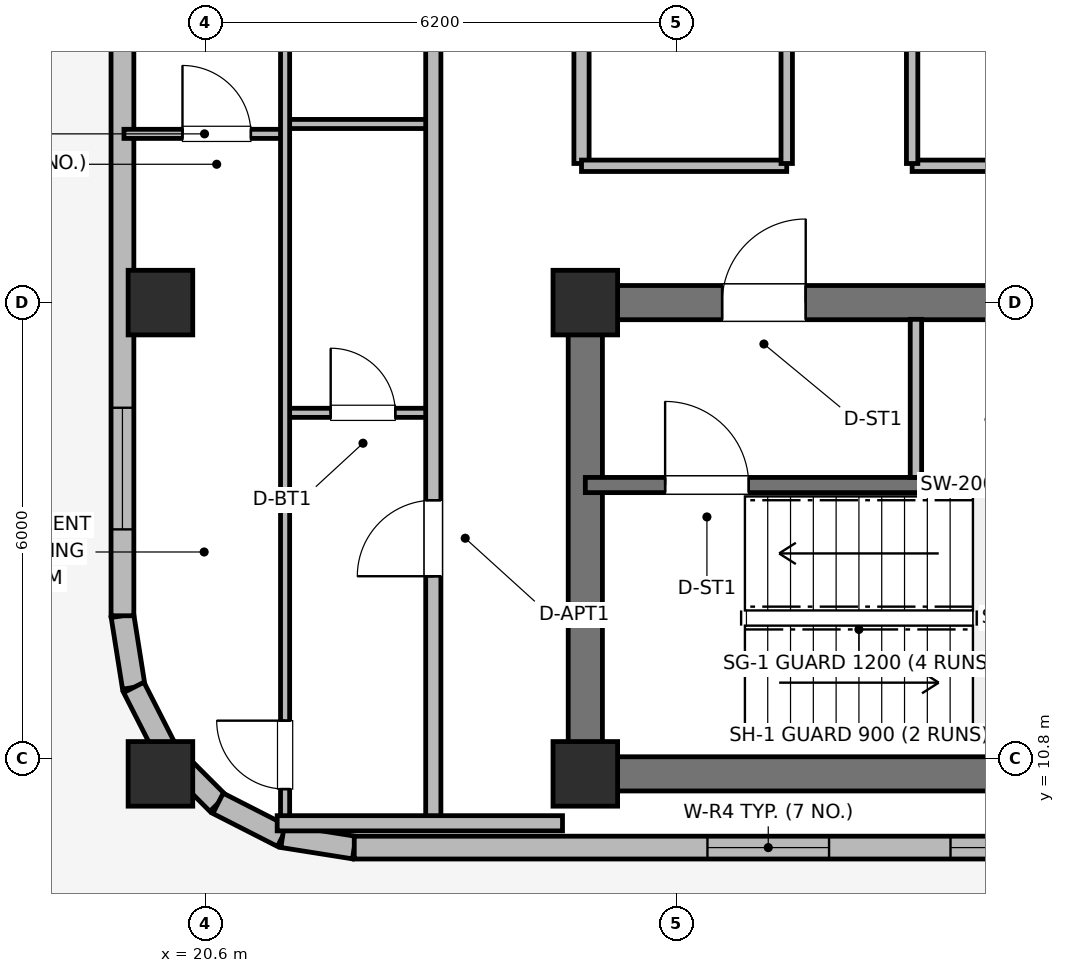
"""IFC4 building model, lengths in metres.
Left out: names, types, materials, properties, quantities, classifications, styles, units other than length and angle.
Written with IfcOpenShell. Run it as: python <this file> out.ifc"""

import sys

from ifc_helpers import new_model, si_unit, direction, frame, frame_2d, origin, origin_2d, place, context, subcontext, project, spatial, rectangle, extrude, element, fill, save


model = new_model("IFC4")
c1 = context("Model", 3, precision=1e-05, world=origin(), true_north=direction((0.0, 1.0)))
c2 = subcontext(c1, "Body", "Model", "MODEL_VIEW")
j1 = project(units=[si_unit("LENGTHUNIT", "METRE"), si_unit("PLANEANGLEUNIT", "RADIAN")], contexts=[c1])
p1 = place(None, origin())
s1 = spatial("IfcSite", under=j1, at=p1, CompositionType="ELEMENT")
p2 = place(p1, origin())
s2 = spatial("IfcBuilding", under=s1, at=p2, CompositionType="ELEMENT")
p3 = place(p2, frame((0.0, 0.0, 225.8)))
s3 = spatial("IfcBuildingStorey", under=s2, at=p3, CompositionType="ELEMENT", Elevation=225.8)
p4 = place(p3, frame((52.8, 10.6, 0.0), z_axis=(0.0, 0.0, 1.0), x_axis=(-1.0, 0.0, 0.0)))
e1 = element("IfcWall", 1, at=p4, inside=s3, PredefinedType="SHEAR", context=c2, shape_type="SweptSolid", body=[
    extrude(rectangle(XDim=27.2, YDim=0.45, at=frame_2d((13.6, 0.0))), origin(), (0.0, 0.0, 1.0), 3.7),
])
p5 = place(p3, frame((25.6, 10.825, 0.0), z_axis=(0.0, 0.0, 1.0), x_axis=(0.0, 1.0, 0.0)))
e2 = element("IfcWall", 2, at=p5, inside=s3, PredefinedType="SHEAR", context=c2, shape_type="SweptSolid", body=[
    extrude(rectangle(XDim=5.75, YDim=0.45, at=frame_2d((2.875, 0.0))), origin(), (0.0, 0.0, 1.0), 3.7),
])
p6 = place(p3, frame((25.6, 16.8, 0.0), z_axis=(0.0, 0.0, 1.0), x_axis=(1.0, 0.0, 0.0)))
e3 = element("IfcWall", 3, at=p6, inside=s3, PredefinedType="SHEAR", context=c2, shape_type="SweptSolid", body=[
    extrude(rectangle(XDim=27.2, YDim=0.45, at=frame_2d((13.6, 0.0))), origin(), (0.0, 0.0, 1.0), 3.7),
])
p7 = place(p6, frame((1.8, 0.0, 0.0)))
e4 = element("IfcOpeningElement", 4, at=p7, cuts=e3, PredefinedType="OPENING", context=c2, shape_type="SweptSolid", body=[
    extrude(rectangle(XDim=1.1, YDim=2.15, at=frame_2d((0.55, 1.075))), frame((0.0, 0.235, 0.0), z_axis=(0.0, -1.0, 0.0), x_axis=(1.0, 0.0, 0.0)), (0.0, 0.0, 1.0), 0.47),
])
p8 = place(p6, frame((5.6, 0.0, 0.0)))
e5 = element("IfcOpeningElement", 5, at=p8, cuts=e3, PredefinedType="OPENING", context=c2, shape_type="SweptSolid", body=[
    extrude(rectangle(XDim=0.85, YDim=2.1, at=frame_2d((0.425, 1.05))), frame((0.0, 0.235, 0.0), z_axis=(0.0, -1.0, 0.0), x_axis=(1.0, 0.0, 0.0)), (0.0, 0.0, 1.0), 0.47),
])
p9 = place(p6, frame((13.0, 0.0, 0.0)))
e6 = element("IfcOpeningElement", 6, at=p9, cuts=e3, PredefinedType="OPENING", context=c2, shape_type="SweptSolid", body=[
    extrude(rectangle(XDim=1.2, YDim=2.15, at=frame_2d((0.6, 1.075))), frame((0.0, 0.235, 0.0), z_axis=(0.0, -1.0, 0.0), x_axis=(1.0, 0.0, 0.0)), (0.0, 0.0, 1.0), 0.47),
])
p10 = place(p6, frame((19.2, 0.0, 0.0)))
e7 = element("IfcOpeningElement", 7, at=p10, cuts=e3, PredefinedType="OPENING", context=c2, shape_type="SweptSolid", body=[
    extrude(rectangle(XDim=0.85, YDim=2.1, at=frame_2d((0.425, 1.05))), frame((0.0, 0.235, 0.0), z_axis=(0.0, -1.0, 0.0), x_axis=(1.0, 0.0, 0.0)), (0.0, 0.0, 1.0), 0.47),
])
p11 = place(p6, frame((23.8, 0.0, 0.0)))
e8 = element("IfcOpeningElement", 8, at=p11, cuts=e3, PredefinedType="OPENING", context=c2, shape_type="SweptSolid", body=[
    extrude(rectangle(XDim=0.9, YDim=2.1, at=frame_2d((0.45, 1.05))), frame((0.0, 0.235, 0.0), z_axis=(0.0, -1.0, 0.0), x_axis=(1.0, 0.0, 0.0)), (0.0, 0.0, 1.0), 0.47),
])
for number, where, z_axis, x_axis in (
    (9, (25.6, 10.6, 0.0), (0.0, 0.0, 1.0), (1.0, 0.0, 0.0)),
    (10, (25.6, 16.8, 0.0), (0.0, 0.0, 1.0), (1.0, 0.0, 0.0)),
    (11, (20.01, 10.6, 0.0), (0.0, 0.0, 1.0), (1.0, 0.0, 0.0)),
    (12, (20.01, 16.8, 0.0), (0.0, 0.0, 1.0), (1.0, 0.0, 0.0)),
):
    element("IfcColumn", number, at=place(p3, frame(where, z_axis=z_axis, x_axis=x_axis)), inside=s3, PredefinedType="COLUMN", context=c2, shape_type="SweptSolid", body=[
        extrude(rectangle(XDim=0.85, YDim=0.85, at=origin_2d()), origin(), (0.0, 0.0, 1.0), 3.7),
    ])
p12 = place(p3, frame((19.51, 12.68, 0.0), z_axis=(0.0, 0.0, 1.0), x_axis=(0.156343617883, -0.987702725088, 0.0)))
e13 = element("IfcWall", 13, at=p12, inside=s3, PredefinedType="SOLIDWALL", context=c2, shape_type="SweptSolid", body=[
    extrude(rectangle(XDim=0.954, YDim=0.3, at=frame_2d((0.477, 0.0))), origin(), (0.0, 0.0, 1.0), 2.73),
])
for number, where, z_axis, x_axis in (
    (14, (19.659, 11.738, 0.0), (0.0, 0.0, 1.0), (0.454, -0.891, 0.0)),
    (15, (20.093, 10.887, 0.0), (0.0, 0.0, 1.0), (0.707, -0.707, 0.0)),
):
    element("IfcWall", number, at=place(p3, frame(where, z_axis=z_axis, x_axis=x_axis)), inside=s3, PredefinedType="SOLIDWALL", context=c2, shape_type="SweptSolid", body=[
        extrude(rectangle(XDim=0.954, YDim=0.3, at=frame_2d((0.477, 0.0))), origin(), (0.0, 0.0, 1.0), 2.73),
    ])
p13 = place(p3, frame((20.767, 10.212, 0.0), z_axis=(0.0, 0.0, 1.0), x_axis=(0.891023873617, -0.45395644796, 0.0)))
e16 = element("IfcWall", 16, at=p13, inside=s3, PredefinedType="SOLIDWALL", context=c2, shape_type="SweptSolid", body=[
    extrude(rectangle(XDim=0.954, YDim=0.3, at=frame_2d((0.477, 0.0))), origin(), (0.0, 0.0, 1.0), 2.73),
])
p14 = place(p3, frame((21.617, 9.779, 0.0), z_axis=(0.0, 0.0, 1.0), x_axis=(0.987669453596, -0.156553666304, 0.0)))
e17 = element("IfcWall", 17, at=p14, inside=s3, PredefinedType="SOLIDWALL", context=c2, shape_type="SweptSolid", body=[
    extrude(rectangle(XDim=0.954, YDim=0.3, at=frame_2d((0.477, 0.0))), origin(), (0.0, 0.0, 1.0), 2.73),
])
p15 = place(p3, frame((22.56, 9.63, 0.0), z_axis=(0.0, 0.0, 1.0), x_axis=(1.0, 0.0, 0.0)))
e18 = element("IfcWall", 18, at=p15, inside=s3, PredefinedType="SOLIDWALL", context=c2, shape_type="SweptSolid", body=[
    extrude(rectangle(XDim=33.28, YDim=0.3, at=frame_2d((16.64, 0.0))), origin(), (0.0, 0.0, 1.0), 2.73),
])
p16 = place(p15, frame((4.647, 0.0, 0.71)))
e19 = element("IfcOpeningElement", 19, at=p16, cuts=e18, PredefinedType="OPENING", context=c2, shape_type="SweptSolid", body=[
    extrude(rectangle(XDim=1.6, YDim=1.9, at=frame_2d((0.8, 0.95))), frame((0.0, 0.16, 0.0), z_axis=(0.0, -1.0, 0.0), x_axis=(1.0, 0.0, 0.0)), (0.0, 0.0, 1.0), 0.32),
])
p17 = place(p15, frame((7.845, 0.0, 0.71)))
e20 = element("IfcOpeningElement", 20, at=p17, cuts=e18, PredefinedType="OPENING", context=c2, shape_type="SweptSolid", body=[
    extrude(rectangle(XDim=1.6, YDim=1.9, at=frame_2d((0.8, 0.95))), frame((0.0, 0.16, 0.0), z_axis=(0.0, -1.0, 0.0), x_axis=(1.0, 0.0, 0.0)), (0.0, 0.0, 1.0), 0.32),
])
p18 = place(p15, frame((14.241, 0.0, 0.71)))
e21 = element("IfcOpeningElement", 21, at=p18, cuts=e18, PredefinedType="OPENING", context=c2, shape_type="SweptSolid", body=[
    extrude(rectangle(XDim=1.6, YDim=1.9, at=frame_2d((0.8, 0.95))), frame((0.0, 0.16, 0.0), z_axis=(0.0, -1.0, 0.0), x_axis=(1.0, 0.0, 0.0)), (0.0, 0.0, 1.0), 0.32),
])
p19 = place(p15, frame((17.439, 0.0, 0.71)))
e22 = element("IfcOpeningElement", 22, at=p19, cuts=e18, PredefinedType="OPENING", context=c2, shape_type="SweptSolid", body=[
    extrude(rectangle(XDim=1.6, YDim=1.9, at=frame_2d((0.8, 0.95))), frame((0.0, 0.16, 0.0), z_axis=(0.0, -1.0, 0.0), x_axis=(1.0, 0.0, 0.0)), (0.0, 0.0, 1.0), 0.32),
])
p20 = place(p15, frame((23.835, 0.0, 0.71)))
e23 = element("IfcOpeningElement", 23, at=p20, cuts=e18, PredefinedType="OPENING", context=c2, shape_type="SweptSolid", body=[
    extrude(rectangle(XDim=1.6, YDim=1.9, at=frame_2d((0.8, 0.95))), frame((0.0, 0.16, 0.0), z_axis=(0.0, -1.0, 0.0), x_axis=(1.0, 0.0, 0.0)), (0.0, 0.0, 1.0), 0.32),
])
p21 = place(p15, frame((27.033, 0.0, 0.71)))
e24 = element("IfcOpeningElement", 24, at=p21, cuts=e18, PredefinedType="OPENING", context=c2, shape_type="SweptSolid", body=[
    extrude(rectangle(XDim=1.6, YDim=1.9, at=frame_2d((0.8, 0.95))), frame((0.0, 0.16, 0.0), z_axis=(0.0, -1.0, 0.0), x_axis=(1.0, 0.0, 0.0)), (0.0, 0.0, 1.0), 0.32),
])
p22 = place(p3, frame((19.51, 23.8, 0.0), z_axis=(0.0, 0.0, 1.0), x_axis=(0.0, -1.0, 0.0)))
e25 = element("IfcWall", 25, at=p22, inside=s3, PredefinedType="SOLIDWALL", context=c2, shape_type="SweptSolid", body=[
    extrude(rectangle(XDim=11.12, YDim=0.3, at=frame_2d((5.56, 0.0))), origin(), (0.0, 0.0, 1.0), 2.73),
])
p23 = place(p22, frame((1.95, 0.0, 0.0)))
e26 = element("IfcOpeningElement", 26, at=p23, cuts=e25, PredefinedType="OPENING", context=c2, shape_type="SweptSolid", body=[
    extrude(rectangle(XDim=1.5, YDim=2.1, at=frame_2d((0.75, 1.05))), frame((0.0, 0.16, 0.0), z_axis=(0.0, -1.0, 0.0), x_axis=(1.0, 0.0, 0.0)), (0.0, 0.0, 1.0), 0.32),
])
p24 = place(p22, frame((8.383, 0.0, 0.71)))
e27 = element("IfcOpeningElement", 27, at=p24, cuts=e25, PredefinedType="OPENING", context=c2, shape_type="SweptSolid", body=[
    extrude(rectangle(XDim=1.6, YDim=1.9, at=frame_2d((0.8, 0.95))), frame((0.0, 0.16, 0.0), z_axis=(0.0, -1.0, 0.0), x_axis=(1.0, 0.0, 0.0)), (0.0, 0.0, 1.0), 0.32),
])
p25 = place(p3, frame((25.6, 14.4, 0.0), z_axis=(0.0, 0.0, 1.0), x_axis=(1.0, 0.0, 0.0)))
e28 = element("IfcWall", 28, at=p25, inside=s3, PredefinedType="SHEAR", context=c2, shape_type="SweptSolid", body=[
    extrude(rectangle(XDim=9.55, YDim=0.2, at=frame_2d((4.775, 0.0))), origin(), (0.0, 0.0, 1.0), 3.7),
])
p26 = place(p25, frame((1.05, 0.0, 0.0)))
e29 = element("IfcOpeningElement", 29, at=p26, cuts=e28, PredefinedType="OPENING", context=c2, shape_type="SweptSolid", body=[
    extrude(rectangle(XDim=1.1, YDim=2.15, at=frame_2d((0.55, 1.075))), frame((0.0, 0.11, 0.0), z_axis=(0.0, -1.0, 0.0), x_axis=(1.0, 0.0, 0.0)), (0.0, 0.0, 1.0), 0.22),
])
p27 = place(p3, frame((29.95, 14.5, 0.0), z_axis=(0.0, 0.0, 1.0), x_axis=(0.0, 1.0, 0.0)))
e30 = element("IfcWall", 30, at=p27, inside=s3, PredefinedType="PARTITIONING", context=c2, shape_type="SweptSolid", body=[
    extrude(rectangle(XDim=2.08, YDim=0.15, at=frame_2d((1.04, 0.0))), origin(), (0.0, 0.0, 1.0), 2.56),
])
p28 = place(p3, frame((25.55, 18.63, 0.0), z_axis=(0.0, 0.0, 1.0), x_axis=(0.0, 1.0, 0.0)))
e31 = element("IfcWall", 31, at=p28, inside=s3, PredefinedType="PARTITIONING", context=c2, shape_type="SweptSolid", body=[
    extrude(rectangle(XDim=19.14, YDim=0.2, at=frame_2d((9.57, 0.0))), origin(), (0.0, 0.0, 1.0), 2.56),
])
p29 = place(p3, frame((25.55, 18.6, 0.0), z_axis=(0.0, 0.0, 1.0), x_axis=(1.0, 0.0, 0.0)))
e32 = element("IfcWall", 32, at=p29, inside=s3, PredefinedType="PARTITIONING", context=c2, shape_type="SweptSolid", body=[
    extrude(rectangle(XDim=2.7, YDim=0.15, at=frame_2d((1.35, 0.0))), origin(), (0.0, 0.0, 1.0), 2.56),
])
p30 = place(p3, frame((29.9, 18.6, 0.0), z_axis=(0.0, 0.0, 1.0), x_axis=(1.0, 0.0, 0.0)))
e33 = element("IfcWall", 33, at=p30, inside=s3, PredefinedType="PARTITIONING", context=c2, shape_type="SweptSolid", body=[
    extrude(rectangle(XDim=22.95, YDim=0.15, at=frame_2d((11.475, 0.0))), origin(), (0.0, 0.0, 1.0), 2.56),
])
p31 = place(p3, frame((28.25, 18.63, 0.0), z_axis=(0.0, 0.0, 1.0), x_axis=(0.0, 1.0, 0.0)))
e34 = element("IfcWall", 34, at=p31, inside=s3, PredefinedType="PARTITIONING", context=c2, shape_type="SweptSolid", body=[
    extrude(rectangle(XDim=19.14, YDim=0.15, at=frame_2d((9.57, 0.0))), origin(), (0.0, 0.0, 1.0), 2.56),
])
p32 = place(p31, frame((3.0, 0.0, 0.0)))
e35 = element("IfcOpeningElement", 35, at=p32, cuts=e34, PredefinedType="OPENING", context=c2, shape_type="SweptSolid", body=[
    extrude(rectangle(XDim=0.9, YDim=2.1, at=frame_2d((0.45, 1.05))), frame((0.0, 0.085, 0.0), z_axis=(0.0, -1.0, 0.0), x_axis=(1.0, 0.0, 0.0)), (0.0, 0.0, 1.0), 0.17),
])
p33 = place(p31, frame((11.5, 0.0, 0.0)))
e36 = element("IfcOpeningElement", 36, at=p33, cuts=e34, PredefinedType="OPENING", context=c2, shape_type="SweptSolid", body=[
    extrude(rectangle(XDim=0.9, YDim=2.1, at=frame_2d((0.45, 1.05))), frame((0.0, 0.085, 0.0), z_axis=(0.0, -1.0, 0.0), x_axis=(1.0, 0.0, 0.0)), (0.0, 0.0, 1.0), 0.17),
])
p34 = place(p3, frame((29.9, 18.63, 0.0), z_axis=(0.0, 0.0, 1.0), x_axis=(0.0, 1.0, 0.0)))
e37 = element("IfcWall", 37, at=p34, inside=s3, PredefinedType="PARTITIONING", context=c2, shape_type="SweptSolid", body=[
    extrude(rectangle(XDim=19.14, YDim=0.15, at=frame_2d((9.57, 0.0))), origin(), (0.0, 0.0, 1.0), 2.56),
])
p35 = place(p34, frame((2.4, 0.0, 0.0)))
e38 = element("IfcOpeningElement", 38, at=p35, cuts=e37, PredefinedType="OPENING", context=c2, shape_type="SweptSolid", body=[
    extrude(rectangle(XDim=1.0, YDim=2.15, at=frame_2d((0.5, 1.075))), frame((0.0, 0.085, 0.0), z_axis=(0.0, -1.0, 0.0), x_axis=(1.0, 0.0, 0.0)), (0.0, 0.0, 1.0), 0.17),
])
p36 = place(p34, frame((8.89, 0.0, 0.0)))
e39 = element("IfcOpeningElement", 39, at=p36, cuts=e37, PredefinedType="OPENING", context=c2, shape_type="SweptSolid", body=[
    extrude(rectangle(XDim=1.0, YDim=2.15, at=frame_2d((0.5, 1.075))), frame((0.0, 0.085, 0.0), z_axis=(0.0, -1.0, 0.0), x_axis=(1.0, 0.0, 0.0)), (0.0, 0.0, 1.0), 0.17),
])
p37 = place(p3, frame((21.65, 15.35, 0.0), z_axis=(0.0, 0.0, 1.0), x_axis=(1.0, 0.0, 0.0)))
e40 = element("IfcWall", 40, at=p37, inside=s3, PredefinedType="PARTITIONING", context=c2, shape_type="SweptSolid", body=[
    extrude(rectangle(XDim=1.95, YDim=0.12, at=frame_2d((0.975, 0.0))), origin(), (0.0, 0.0, 1.0), 2.56),
])
p38 = place(p37, frame((0.6, 0.0, 0.0)))
e41 = element("IfcOpeningElement", 41, at=p38, cuts=e40, PredefinedType="OPENING", context=c2, shape_type="SweptSolid", body=[
    extrude(rectangle(XDim=0.85, YDim=2.1, at=frame_2d((0.425, 1.05))), frame((0.0, 0.07, 0.0), z_axis=(0.0, -1.0, 0.0), x_axis=(1.0, 0.0, 0.0)), (0.0, 0.0, 1.0), 0.14),
])
p39 = place(p3, frame((21.65, 19.15, 0.0), z_axis=(0.0, 0.0, 1.0), x_axis=(1.0, 0.0, 0.0)))
e42 = element("IfcWall", 42, at=p39, inside=s3, PredefinedType="PARTITIONING", context=c2, shape_type="SweptSolid", body=[
    extrude(rectangle(XDim=1.95, YDim=0.12, at=frame_2d((0.975, 0.0))), origin(), (0.0, 0.0, 1.0), 2.56),
])
p40 = place(p3, frame((19.53, 19.02, 0.0), z_axis=(0.0, 0.0, 1.0), x_axis=(1.0, 0.0, 0.0)))
e43 = element("IfcWall", 43, at=p40, inside=s3, PredefinedType="PARTITIONING", context=c2, shape_type="SweptSolid", body=[
    extrude(rectangle(XDim=2.12, YDim=0.12, at=frame_2d((1.06, 0.0))), origin(), (0.0, 0.0, 1.0), 2.56),
])
p41 = place(p40, frame((0.77, 0.0, 0.0)))
e44 = element("IfcOpeningElement", 44, at=p41, cuts=e43, PredefinedType="OPENING", context=c2, shape_type="SweptSolid", body=[
    extrude(rectangle(XDim=0.9, YDim=2.1, at=frame_2d((0.45, 1.05))), frame((0.0, 0.07, 0.0), z_axis=(0.0, -1.0, 0.0), x_axis=(1.0, 0.0, 0.0)), (0.0, 0.0, 1.0), 0.14),
])
p42 = place(p3, frame((21.65, 9.99, 0.0), z_axis=(0.0, 0.0, 1.0), x_axis=(0.0, 1.0, 0.0)))
e45 = element("IfcWall", 45, at=p42, inside=s3, PredefinedType="PARTITIONING", context=c2, shape_type="SweptSolid", body=[
    extrude(rectangle(XDim=36.42, YDim=0.12, at=frame_2d((18.21, 0.0))), origin(), (0.0, 0.0, 1.0), 2.56),
])
p43 = place(p42, frame((0.41, 0.0, 0.0)))
e46 = element("IfcOpeningElement", 46, at=p43, cuts=e45, PredefinedType="OPENING", context=c2, shape_type="SweptSolid", body=[
    extrude(rectangle(XDim=0.9, YDim=2.1, at=frame_2d((0.45, 1.05))), frame((0.0, 0.07, 0.0), z_axis=(0.0, -1.0, 0.0), x_axis=(1.0, 0.0, 0.0)), (0.0, 0.0, 1.0), 0.14),
])
p44 = place(p42, frame((15.56, 0.0, 0.0)))
e47 = element("IfcOpeningElement", 47, at=p44, cuts=e45, PredefinedType="OPENING", context=c2, shape_type="SweptSolid", body=[
    extrude(rectangle(XDim=0.82, YDim=2.08, at=frame_2d((0.41, 1.04))), frame((0.0, 0.07, 0.0), z_axis=(0.0, -1.0, 0.0), x_axis=(1.0, 0.0, 0.0)), (0.0, 0.0, 1.0), 0.14),
])
p45 = place(p3, frame((23.6, 9.95, 0.0), z_axis=(0.0, 0.0, 1.0), x_axis=(0.0, 1.0, 0.0)))
e48 = element("IfcWall", 48, at=p45, inside=s3, PredefinedType="PARTITIONING", context=c2, shape_type="SweptSolid", body=[
    extrude(rectangle(XDim=36.5, YDim=0.2, at=frame_2d((18.25, 0.0))), origin(), (0.0, 0.0, 1.0), 2.56),
])
p46 = place(p45, frame((3.25, 0.0, 0.0)))
e49 = element("IfcOpeningElement", 49, at=p46, cuts=e48, PredefinedType="OPENING", context=c2, shape_type="SweptSolid", body=[
    extrude(rectangle(XDim=1.0, YDim=2.15, at=frame_2d((0.5, 1.075))), frame((0.0, 0.11, 0.0), z_axis=(0.0, -1.0, 0.0), x_axis=(1.0, 0.0, 0.0)), (0.0, 0.0, 1.0), 0.22),
])
p47 = place(p3, frame((21.546, 9.95, 0.0), z_axis=(0.0, 0.0, 1.0), x_axis=(1.0, 0.0, 0.0)))
e50 = element("IfcWall", 50, at=p47, inside=s3, PredefinedType="PARTITIONING", context=c2, shape_type="SweptSolid", body=[
    extrude(rectangle(XDim=3.754, YDim=0.2, at=frame_2d((1.877, 0.0))), origin(), (0.0, 0.0, 1.0), 2.56),
])
p48 = place(p16, origin())
e51 = element("IfcWindow", 51, at=p48, inside=s3, PartitioningType="SINGLE_PANEL", PredefinedType="WINDOW", context=c2, shape_type="SweptSolid", body=[
    extrude(rectangle(XDim=1.6, YDim=1.9, at=frame_2d((0.8, 0.95))), frame((0.0, 0.03, 0.0), z_axis=(0.0, -1.0, 0.0), x_axis=(1.0, 0.0, 0.0)), (0.0, 0.0, 1.0), 0.06),
])
fill(e19, e51)
p49 = place(p17, origin())
e52 = element("IfcWindow", 52, at=p49, inside=s3, PartitioningType="SINGLE_PANEL", PredefinedType="WINDOW", context=c2, shape_type="SweptSolid", body=[
    extrude(rectangle(XDim=1.6, YDim=1.9, at=frame_2d((0.8, 0.95))), frame((0.0, 0.03, 0.0), z_axis=(0.0, -1.0, 0.0), x_axis=(1.0, 0.0, 0.0)), (0.0, 0.0, 1.0), 0.06),
])
fill(e20, e52)
p50 = place(p24, origin())
e53 = element("IfcWindow", 53, at=p50, inside=s3, PartitioningType="SINGLE_PANEL", PredefinedType="WINDOW", context=c2, shape_type="SweptSolid", body=[
    extrude(rectangle(XDim=1.6, YDim=1.9, at=frame_2d((0.8, 0.95))), frame((0.0, 0.03, 0.0), z_axis=(0.0, -1.0, 0.0), x_axis=(1.0, 0.0, 0.0)), (0.0, 0.0, 1.0), 0.06),
])
fill(e27, e53)
p51 = place(p26, origin())
e54 = element("IfcDoor", 54, at=p51, inside=s3, OperationType="SINGLE_SWING_LEFT", PredefinedType="DOOR", context=c2, shape_type="SweptSolid", body=[
    extrude(rectangle(XDim=1.1, YDim=2.15, at=frame_2d((0.55, 1.075))), frame((0.0, 0.025, 0.0), z_axis=(0.0, -1.0, 0.0), x_axis=(1.0, 0.0, 0.0)), (0.0, 0.0, 1.0), 0.05),
])
fill(e29, e54)
p52 = place(p38, origin())
e55 = element("IfcDoor", 55, at=p52, inside=s3, OperationType="SINGLE_SWING_LEFT", PredefinedType="DOOR", context=c2, shape_type="SweptSolid", body=[
    extrude(rectangle(XDim=0.85, YDim=2.1, at=frame_2d((0.425, 1.05))), frame((0.0, 0.025, 0.0), z_axis=(0.0, -1.0, 0.0), x_axis=(1.0, 0.0, 0.0)), (0.0, 0.0, 1.0), 0.05),
])
fill(e41, e55)
p53 = place(p41, origin())
e56 = element("IfcDoor", 56, at=p53, inside=s3, OperationType="SINGLE_SWING_LEFT", PredefinedType="DOOR", context=c2, shape_type="SweptSolid", body=[
    extrude(rectangle(XDim=0.9, YDim=2.1, at=frame_2d((0.45, 1.05))), frame((0.0, 0.025, 0.0), z_axis=(0.0, -1.0, 0.0), x_axis=(1.0, 0.0, 0.0)), (0.0, 0.0, 1.0), 0.05),
])
fill(e44, e56)
p54 = place(p43, origin())
e57 = element("IfcDoor", 57, at=p54, inside=s3, OperationType="SINGLE_SWING_RIGHT", PredefinedType="DOOR", context=c2, shape_type="SweptSolid", body=[
    extrude(rectangle(XDim=0.9, YDim=2.1, at=frame_2d((0.45, 1.05))), frame((0.0, 0.025, 0.0), z_axis=(0.0, -1.0, 0.0), x_axis=(1.0, 0.0, 0.0)), (0.0, 0.0, 1.0), 0.05),
])
fill(e46, e57)
p55 = place(p46, origin())
e58 = element("IfcDoor", 58, at=p55, inside=s3, OperationType="SINGLE_SWING_LEFT", PredefinedType="DOOR", context=c2, shape_type="SweptSolid", body=[
    extrude(rectangle(XDim=1.0, YDim=2.15, at=frame_2d((0.5, 1.075))), frame((0.0, 0.025, 0.0), z_axis=(0.0, -1.0, 0.0), x_axis=(1.0, 0.0, 0.0)), (0.0, 0.0, 1.0), 0.05),
])
fill(e49, e58)
p56 = place(p7, origin())
e59 = element("IfcDoor", 59, at=p56, inside=s3, OperationType="SINGLE_SWING_RIGHT", PredefinedType="DOOR", context=c2, shape_type="SweptSolid", body=[
    extrude(rectangle(XDim=1.1, YDim=2.15, at=frame_2d((0.55, 1.075))), frame((0.0, 0.025, 0.0), z_axis=(0.0, -1.0, 0.0), x_axis=(1.0, 0.0, 0.0)), (0.0, 0.0, 1.0), 0.05),
])
fill(e4, e59)
save(model, sys.argv[1])
